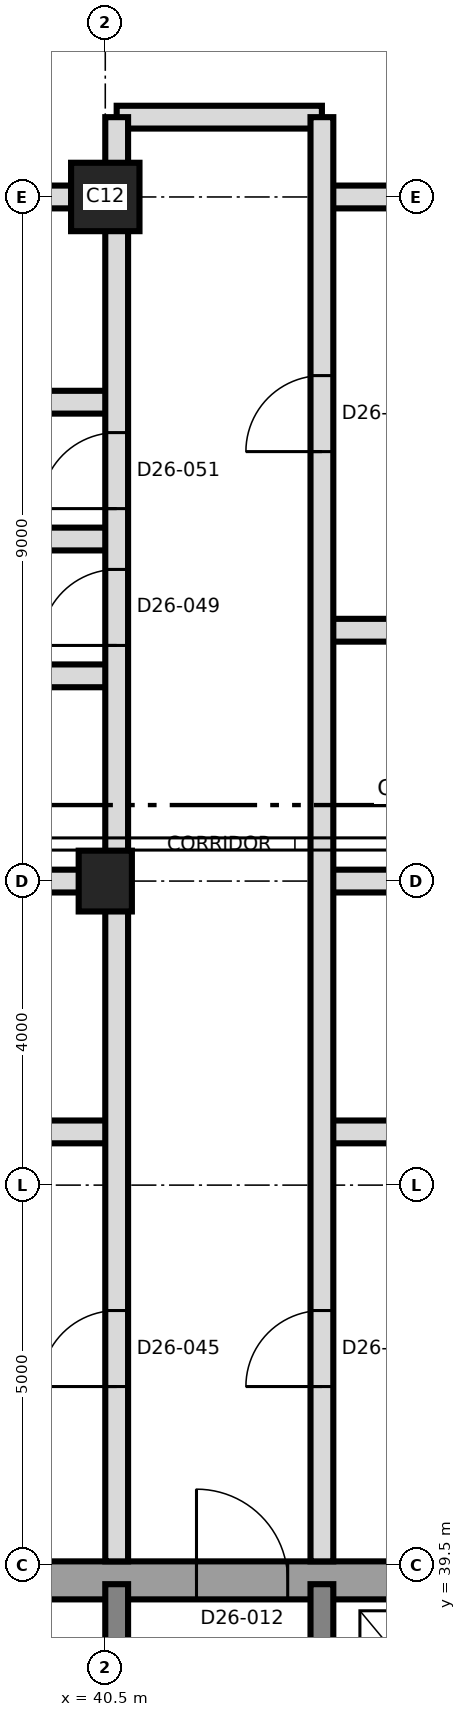
"""IFC4 building model, lengths in metres.
Left out: names, types, materials, properties, quantities, classifications, styles, units other than length and angle.
Written with IfcOpenShell. Run it as: python <this file> out.ifc"""

import sys

from ifc_helpers import new_model, si_unit, direction, frame, frame_2d, origin, origin_2d, place, context, subcontext, project, spatial, rectangle, extrude, element, fill, save


model = new_model("IFC4")
c1 = context("Model", 3, precision=1e-05, world=origin(), true_north=direction((0.0, 1.0)))
c2 = subcontext(c1, "Body", "Model", "MODEL_VIEW")
j1 = project(units=[si_unit("LENGTHUNIT", "METRE"), si_unit("PLANEANGLEUNIT", "RADIAN")], contexts=[c1])
p1 = place(None, origin())
s1 = spatial("IfcSite", under=j1, at=p1, CompositionType="ELEMENT")
p2 = place(p1, origin())
s2 = spatial("IfcBuilding", under=s1, at=p2, CompositionType="ELEMENT")
p3 = place(p2, frame((0.0, 0.0, 240.2)))
s3 = spatial("IfcBuildingStorey", under=s2, at=p3, CompositionType="ELEMENT", Elevation=240.2)
p4 = place(p3, frame((31.25, 39.3, 0.0), z_axis=(0.0, 0.0, 1.0), x_axis=(1.0, 0.0, 0.0)))
e1 = element("IfcWall", 1, at=p4, inside=s3, PredefinedType="SHEAR", context=c2, shape_type="SweptSolid", body=[
    extrude(rectangle(XDim=27.0, YDim=0.5, at=frame_2d((13.5, 0.0))), origin(), (0.0, 0.0, 1.0), 3.7),
])
p5 = place(p4, frame((10.45, 0.0, 0.0)))
e2 = element("IfcOpeningElement", 2, at=p5, cuts=e1, PredefinedType="OPENING", context=c2, shape_type="SweptSolid", body=[
    extrude(rectangle(XDim=1.2, YDim=2.1, at=frame_2d((0.6, 1.05))), frame((0.0, 0.26, 0.0), z_axis=(0.0, -1.0, 0.0), x_axis=(1.0, 0.0, 0.0)), (0.0, 0.0, 1.0), 0.52),
])
for number, where, z_axis, x_axis in (
    (3, (40.65, 33.5, 0.0), (0.0, 0.0, 1.0), (0.0, 1.0, 0.0)),
    (4, (43.35, 33.5, 0.0), (0.0, 0.0, 1.0), (0.0, 1.0, 0.0)),
):
    element("IfcWall", number, at=place(p3, frame(where, z_axis=z_axis, x_axis=x_axis)), inside=s3, PredefinedType="SHEAR", context=c2, shape_type="SweptSolid", body=[
        extrude(rectangle(XDim=5.75, YDim=0.3, at=frame_2d((2.875, 0.0))), origin(), (0.0, 0.0, 1.0), 3.7),
    ])
p6 = place(p3, frame((40.5, 48.5, 0.0), z_axis=(0.0, 0.0, 1.0), x_axis=(0.0, 1.0, 0.0)))
e5 = element("IfcColumn", 5, at=p6, inside=s3, PredefinedType="COLUMN", context=c2, shape_type="SweptSolid", body=[
    extrude(rectangle(XDim=0.8, YDim=0.7, at=origin_2d()), origin(), (0.0, 0.0, 1.0), 3.7),
])
p7 = place(p3, frame((40.5, 57.5, 0.0), z_axis=(0.0, 0.0, 1.0), x_axis=(1.0, 0.0, 0.0)))
e6 = element("IfcColumn", 6, at=p7, inside=s3, PredefinedType="COLUMN", context=c2, shape_type="SweptSolid", body=[
    extrude(rectangle(XDim=0.9, YDim=0.9, at=origin_2d()), origin(), (0.0, 0.0, 1.0), 3.7),
])
for number, where, z_axis, x_axis in (
    (7, (37.15, 45.2, 0.0), (0.0, 0.0, 1.0), (1.0, 0.0, 0.0)),
    (8, (43.35, 45.2, 0.0), (0.0, 0.0, 1.0), (1.0, 0.0, 0.0)),
):
    element("IfcWall", number, at=place(p3, frame(where, z_axis=z_axis, x_axis=x_axis)), inside=s3, PredefinedType="PARTITIONING", context=c2, shape_type="SweptSolid", body=[
        extrude(rectangle(XDim=3.5, YDim=0.3, at=frame_2d((1.75, 0.0))), origin(), (0.0, 0.0, 1.0), 3.4),
    ])
p8 = place(p3, frame((29.275, 48.5, 0.0), z_axis=(0.0, 0.0, 1.0), x_axis=(1.0, 0.0, 0.0)))
e9 = element("IfcWall", 9, at=p8, inside=s3, PredefinedType="PARTITIONING", context=c2, shape_type="SweptSolid", body=[
    extrude(rectangle(XDim=11.375, YDim=0.3, at=frame_2d((5.688, 0.0))), origin(), (0.0, 0.0, 1.0), 3.35),
])
p9 = place(p3, frame((43.35, 48.5, 0.0), z_axis=(0.0, 0.0, 1.0), x_axis=(1.0, 0.0, 0.0)))
e10 = element("IfcWall", 10, at=p9, inside=s3, PredefinedType="PARTITIONING", context=c2, shape_type="SweptSolid", body=[
    extrude(rectangle(XDim=8.555, YDim=0.3, at=frame_2d((4.277, 0.0))), origin(), (0.0, 0.0, 1.0), 3.35),
])
p10 = place(p3, frame((37.45, 51.2, 0.0), z_axis=(0.0, 0.0, 1.0), x_axis=(1.0, 0.0, 0.0)))
e11 = element("IfcWall", 11, at=p10, inside=s3, PredefinedType="PARTITIONING", context=c2, shape_type="SweptSolid", body=[
    extrude(rectangle(XDim=3.2, YDim=0.3, at=frame_2d((1.6, 0.0))), origin(), (0.0, 0.0, 1.0), 3.4),
])
p11 = place(p3, frame((43.35, 51.8, 0.0), z_axis=(0.0, 0.0, 1.0), x_axis=(1.0, 0.0, 0.0)))
e12 = element("IfcWall", 12, at=p11, inside=s3, PredefinedType="PARTITIONING", context=c2, shape_type="SweptSolid", body=[
    extrude(rectangle(XDim=3.5, YDim=0.3, at=frame_2d((1.75, 0.0))), origin(), (0.0, 0.0, 1.0), 3.4),
])
p12 = place(p3, frame((29.812, 53.0, 0.0), z_axis=(0.0, 0.0, 1.0), x_axis=(1.0, 0.0, 0.0)))
e13 = element("IfcWall", 13, at=p12, inside=s3, PredefinedType="PARTITIONING", context=c2, shape_type="SweptSolid", body=[
    extrude(rectangle(XDim=10.838, YDim=0.3, at=frame_2d((5.419, 0.0))), origin(), (0.0, 0.0, 1.0), 3.35),
])
p13 = place(p3, frame((37.45, 54.8, 0.0), z_axis=(0.0, 0.0, 1.0), x_axis=(1.0, 0.0, 0.0)))
e14 = element("IfcWall", 14, at=p13, inside=s3, PredefinedType="PARTITIONING", context=c2, shape_type="SweptSolid", body=[
    extrude(rectangle(XDim=3.2, YDim=0.3, at=frame_2d((1.6, 0.0))), origin(), (0.0, 0.0, 1.0), 3.4),
])
p14 = place(p3, frame((33.088, 57.5, 0.0), z_axis=(0.0, 0.0, 1.0), x_axis=(1.0, 0.0, 0.0)))
e15 = element("IfcWall", 15, at=p14, inside=s3, PredefinedType="PARTITIONING", context=c2, shape_type="SweptSolid", body=[
    extrude(rectangle(XDim=7.562, YDim=0.3, at=frame_2d((3.781, 0.0))), origin(), (0.0, 0.0, 1.0), 3.35),
])
p15 = place(p3, frame((43.35, 57.5, 0.0), z_axis=(0.0, 0.0, 1.0), x_axis=(1.0, 0.0, 0.0)))
e16 = element("IfcWall", 16, at=p15, inside=s3, PredefinedType="PARTITIONING", context=c2, shape_type="SweptSolid", body=[
    extrude(rectangle(XDim=4.562, YDim=0.3, at=frame_2d((2.281, 0.0))), origin(), (0.0, 0.0, 1.0), 3.35),
])
p16 = place(p3, frame((40.65, 58.55, 0.0), z_axis=(0.0, 0.0, 1.0), x_axis=(1.0, 0.0, 0.0)))
e17 = element("IfcWall", 17, at=p16, inside=s3, PredefinedType="PARTITIONING", context=c2, shape_type="SweptSolid", body=[
    extrude(rectangle(XDim=2.7, YDim=0.3, at=frame_2d((1.35, 0.0))), origin(), (0.0, 0.0, 1.0), 3.35),
])
p17 = place(p3, frame((40.65, 39.55, 0.0), z_axis=(0.0, 0.0, 1.0), x_axis=(0.0, 1.0, 0.0)))
e18 = element("IfcWall", 18, at=p17, inside=s3, PredefinedType="PARTITIONING", context=c2, shape_type="SweptSolid", body=[
    extrude(rectangle(XDim=19.0, YDim=0.3, at=frame_2d((9.5, 0.0))), origin(), (0.0, 0.0, 1.0), 3.4),
])
p18 = place(p17, frame((2.3, 0.0, 0.0)))
e19 = element("IfcOpeningElement", 19, at=p18, cuts=e18, PredefinedType="OPENING", context=c2, shape_type="SweptSolid", body=[
    extrude(rectangle(XDim=1.0, YDim=2.4, at=frame_2d((0.5, 1.2))), frame((0.0, 0.16, 0.0), z_axis=(0.0, -1.0, 0.0), x_axis=(1.0, 0.0, 0.0)), (0.0, 0.0, 1.0), 0.32),
])
p19 = place(p17, frame((12.05, 0.0, 0.0)))
e20 = element("IfcOpeningElement", 20, at=p19, cuts=e18, PredefinedType="OPENING", context=c2, shape_type="SweptSolid", body=[
    extrude(rectangle(XDim=1.0, YDim=2.1, at=frame_2d((0.5, 1.05))), frame((0.0, 0.16, 0.0), z_axis=(0.0, -1.0, 0.0), x_axis=(1.0, 0.0, 0.0)), (0.0, 0.0, 1.0), 0.32),
])
p20 = place(p17, frame((13.85, 0.0, 0.0)))
e21 = element("IfcOpeningElement", 21, at=p20, cuts=e18, PredefinedType="OPENING", context=c2, shape_type="SweptSolid", body=[
    extrude(rectangle(XDim=1.0, YDim=2.1, at=frame_2d((0.5, 1.05))), frame((0.0, 0.16, 0.0), z_axis=(0.0, -1.0, 0.0), x_axis=(1.0, 0.0, 0.0)), (0.0, 0.0, 1.0), 0.32),
])
p21 = place(p3, frame((43.35, 39.55, 0.0), z_axis=(0.0, 0.0, 1.0), x_axis=(0.0, 1.0, 0.0)))
e22 = element("IfcWall", 22, at=p21, inside=s3, PredefinedType="PARTITIONING", context=c2, shape_type="SweptSolid", body=[
    extrude(rectangle(XDim=19.0, YDim=0.3, at=frame_2d((9.5, 0.0))), origin(), (0.0, 0.0, 1.0), 3.35),
])
p22 = place(p21, frame((2.3, 0.0, 0.0)))
e23 = element("IfcOpeningElement", 23, at=p22, cuts=e22, PredefinedType="OPENING", context=c2, shape_type="SweptSolid", body=[
    extrude(rectangle(XDim=1.0, YDim=2.4, at=frame_2d((0.5, 1.2))), frame((0.0, 0.16, 0.0), z_axis=(0.0, -1.0, 0.0), x_axis=(1.0, 0.0, 0.0)), (0.0, 0.0, 1.0), 0.32),
])
p23 = place(p21, frame((14.6, 0.0, 0.0)))
e24 = element("IfcOpeningElement", 24, at=p23, cuts=e22, PredefinedType="OPENING", context=c2, shape_type="SweptSolid", body=[
    extrude(rectangle(XDim=1.0, YDim=2.4, at=frame_2d((0.5, 1.2))), frame((0.0, 0.16, 0.0), z_axis=(0.0, -1.0, 0.0), x_axis=(1.0, 0.0, 0.0)), (0.0, 0.0, 1.0), 0.32),
])
p24 = place(p5, origin())
e25 = element("IfcDoor", 25, at=p24, inside=s3, OperationType="SINGLE_SWING_RIGHT", PredefinedType="DOOR", context=c2, shape_type="SweptSolid", body=[
    extrude(rectangle(XDim=1.2, YDim=2.1, at=frame_2d((0.6, 1.05))), frame((0.0, 0.025, 0.0), z_axis=(0.0, -1.0, 0.0), x_axis=(1.0, 0.0, 0.0)), (0.0, 0.0, 1.0), 0.05),
])
fill(e2, e25)
p25 = place(p22, origin())
e26 = element("IfcDoor", 26, at=p25, inside=s3, OperationType="SINGLE_SWING_LEFT", PredefinedType="DOOR", context=c2, shape_type="SweptSolid", body=[
    extrude(rectangle(XDim=1.0, YDim=2.4, at=frame_2d((0.5, 1.2))), frame((0.0, 0.025, 0.0), z_axis=(0.0, -1.0, 0.0), x_axis=(1.0, 0.0, 0.0)), (0.0, 0.0, 1.0), 0.05),
])
fill(e23, e26)
p26 = place(p18, origin())
e27 = element("IfcDoor", 27, at=p26, inside=s3, OperationType="SINGLE_SWING_LEFT", PredefinedType="DOOR", context=c2, shape_type="SweptSolid", body=[
    extrude(rectangle(XDim=1.0, YDim=2.4, at=frame_2d((0.5, 1.2))), frame((0.0, 0.025, 0.0), z_axis=(0.0, -1.0, 0.0), x_axis=(1.0, 0.0, 0.0)), (0.0, 0.0, 1.0), 0.05),
])
fill(e19, e27)
p27 = place(p23, origin())
e28 = element("IfcDoor", 28, at=p27, inside=s3, OperationType="SINGLE_SWING_RIGHT", PredefinedType="DOOR", context=c2, shape_type="SweptSolid", body=[
    extrude(rectangle(XDim=1.0, YDim=2.4, at=frame_2d((0.5, 1.2))), frame((0.0, 0.025, 0.0), z_axis=(0.0, -1.0, 0.0), x_axis=(1.0, 0.0, 0.0)), (0.0, 0.0, 1.0), 0.05),
])
fill(e24, e28)
p28 = place(p19, origin())
e29 = element("IfcDoor", 29, at=p28, inside=s3, OperationType="SINGLE_SWING_LEFT", PredefinedType="DOOR", context=c2, shape_type="SweptSolid", body=[
    extrude(rectangle(XDim=1.0, YDim=2.1, at=frame_2d((0.5, 1.05))), frame((0.0, 0.025, 0.0), z_axis=(0.0, -1.0, 0.0), x_axis=(1.0, 0.0, 0.0)), (0.0, 0.0, 1.0), 0.05),
])
fill(e20, e29)
p29 = place(p20, origin())
e30 = element("IfcDoor", 30, at=p29, inside=s3, OperationType="SINGLE_SWING_LEFT", PredefinedType="DOOR", context=c2, shape_type="SweptSolid", body=[
    extrude(rectangle(XDim=1.0, YDim=2.1, at=frame_2d((0.5, 1.05))), frame((0.0, 0.025, 0.0), z_axis=(0.0, -1.0, 0.0), x_axis=(1.0, 0.0, 0.0)), (0.0, 0.0, 1.0), 0.05),
])
fill(e21, e30)
save(model, sys.argv[1])
